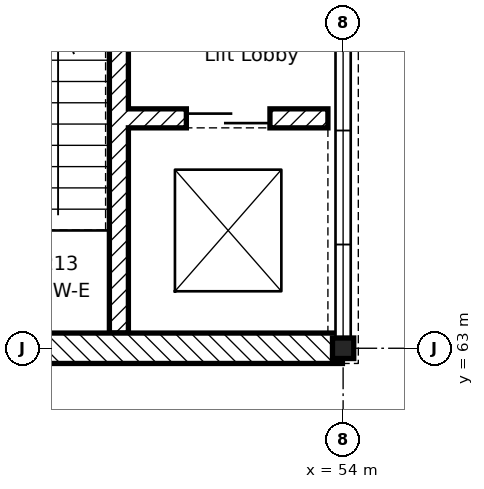
"""IFC4 building model, lengths in metres.
Left out: names, types, materials, properties, quantities, classifications, styles, units other than length and angle.
Written with IfcOpenShell. Run it as: python <this file> out.ifc"""

import sys

from ifc_helpers import new_model, si_unit, direction, frame, frame_2d, origin, origin_2d, place, context, subcontext, project, spatial, rectangle, i_section, extrude, element, fill, save


model = new_model("IFC4")
c1 = context("Model", 3, precision=1e-05, world=origin(), true_north=direction((0.0, 1.0)))
c2 = subcontext(c1, "Body", "Model", "MODEL_VIEW")
j1 = project(units=[si_unit("LENGTHUNIT", "METRE"), si_unit("PLANEANGLEUNIT", "RADIAN")], contexts=[c1])
p1 = place(None, origin())
s1 = spatial("IfcSite", under=j1, at=p1, CompositionType="ELEMENT")
p2 = place(p1, origin())
s2 = spatial("IfcBuilding", under=s1, at=p2, CompositionType="ELEMENT")
p3 = place(p2, frame((0.0, 0.0, 9.9)))
s3 = spatial("IfcBuildingStorey", under=s2, at=p3, CompositionType="ELEMENT", Elevation=9.9)
p4 = place(p3, frame((54.0, 63.0, -0.2), z_axis=(0.0, 0.0, 1.0), x_axis=(1.0, 0.0, 0.0)))
e1 = element("IfcColumn", 1, at=p4, inside=s3, PredefinedType="COLUMN", context=c2, shape_type="SweptSolid", body=[
    extrude(i_section(OverallWidth=0.28, OverallDepth=0.27, WebThickness=0.008, FlangeThickness=0.013, FilletRadius=0.024, at=origin_2d()), origin(), (0.0, 0.0, 1.0), 4.5),
])
p5 = place(p3, frame((51.05, 63.2, 0.0), z_axis=(0.0, 0.0, 1.0), x_axis=(0.0, 1.0, 0.0)))
e2 = element("IfcWall", 2, at=p5, inside=s3, PredefinedType="SHEAR", context=c2, shape_type="SweptSolid", body=[
    extrude(rectangle(XDim=7.225, YDim=0.25, at=frame_2d((3.613, 0.0))), origin(), (0.0, 0.0, 1.0), 4.3),
])
p6 = place(p3, frame((51.175, 66.025, 0.0), z_axis=(0.0, 0.0, 1.0), x_axis=(1.0, 0.0, 0.0)))
e3 = element("IfcWall", 3, at=p6, inside=s3, PredefinedType="SHEAR", context=c2, shape_type="SweptSolid", body=[
    extrude(rectangle(XDim=2.625, YDim=0.25, at=frame_2d((1.312, 0.0))), origin(), (0.0, 0.0, 1.0), 4.3),
])
p7 = place(p6, frame((0.762, 0.0, 0.0)))
e4 = element("IfcOpeningElement", 4, at=p7, cuts=e3, PredefinedType="OPENING", context=c2, shape_type="SweptSolid", body=[
    extrude(rectangle(XDim=1.1, YDim=2.1, at=frame_2d((0.55, 1.05))), frame((0.0, 0.135, 0.0), z_axis=(0.0, -1.0, 0.0), x_axis=(1.0, 0.0, 0.0)), (0.0, 0.0, 1.0), 0.27),
])
p8 = place(p3, frame((53.991, 63.0, 0.0), z_axis=(0.0, 0.0, 1.0), x_axis=(-1.0, 0.0, 0.0)))
e5 = element("IfcWall", 5, at=p8, inside=s3, PredefinedType="STANDARD", context=c2, shape_type="SweptSolid", body=[
    extrude(rectangle(XDim=8.982, YDim=0.4, at=frame_2d((4.491, 0.0))), origin(), (0.0, 0.0, 1.0), 3.9),
])
p9 = place(p8, frame((6.891, 0.0, 0.9)))
e6 = element("IfcOpeningElement", 6, at=p9, cuts=e5, PredefinedType="OPENING", context=c2, shape_type="SweptSolid", body=[
    extrude(rectangle(XDim=1.2, YDim=2.4, at=frame_2d((0.6, 1.2))), frame((0.0, 0.21, 0.0), z_axis=(0.0, -1.0, 0.0), x_axis=(1.0, 0.0, 0.0)), (0.0, 0.0, 1.0), 0.42),
])
p10 = place(p8, frame((3.891, 0.0, 0.9)))
e7 = element("IfcOpeningElement", 7, at=p10, cuts=e5, PredefinedType="OPENING", context=c2, shape_type="SweptSolid", body=[
    extrude(rectangle(XDim=1.2, YDim=2.7, at=frame_2d((0.6, 1.35))), frame((0.0, 0.21, 0.0), z_axis=(0.0, -1.0, 0.0), x_axis=(1.0, 0.0, 0.0)), (0.0, 0.0, 1.0), 0.42),
])
p11 = place(p7, origin())
e8 = element("IfcDoor", 8, at=p11, inside=s3, OperationType="SLIDING_TO_LEFT", PredefinedType="DOOR", context=c2, shape_type="SweptSolid", body=[
    extrude(rectangle(XDim=1.1, YDim=2.1, at=frame_2d((0.55, 1.05))), frame((0.0, 0.025, 0.0), z_axis=(0.0, -1.0, 0.0), x_axis=(1.0, 0.0, 0.0)), (0.0, 0.0, 1.0), 0.05),
])
fill(e4, e8)
save(model, sys.argv[1])
